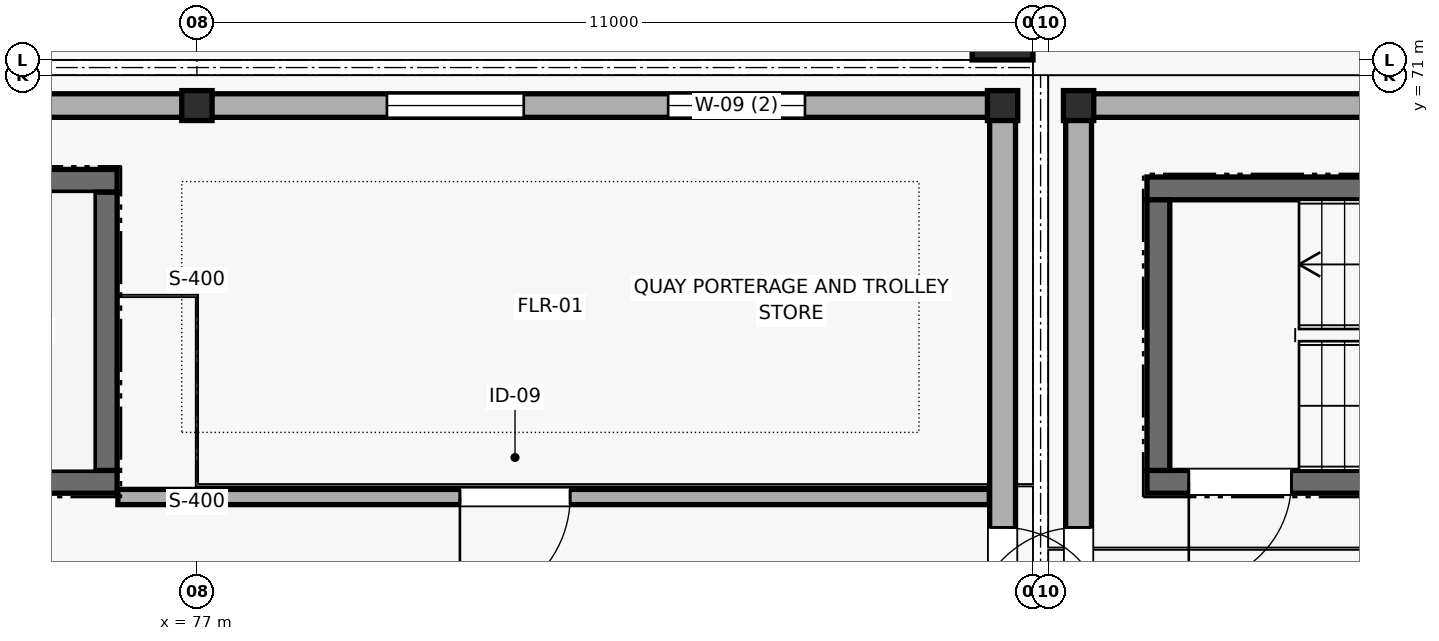
"""IFC4 building model, lengths in metres.
Left out: names, types, materials, properties, quantities, classifications, styles, units other than length and angle.
Written with IfcOpenShell. Run it as: python <this file> out.ifc"""

import sys

from ifc_helpers import new_model, si_unit, direction, frame, frame_2d, origin, origin_2d, place, context, subcontext, project, spatial, rectangle, i_section, extrude, element, fill, save


model = new_model("IFC4")
c1 = context("Model", 3, precision=1e-05, world=origin(), true_north=direction((0.0, 1.0)))
c2 = subcontext(c1, "Body", "Model", "MODEL_VIEW")
j1 = project(units=[si_unit("LENGTHUNIT", "METRE"), si_unit("PLANEANGLEUNIT", "RADIAN")], contexts=[c1])
p1 = place(None, origin())
s1 = spatial("IfcSite", under=j1, at=p1, CompositionType="ELEMENT")
p2 = place(p1, origin())
s2 = spatial("IfcBuilding", under=s1, at=p2, CompositionType="ELEMENT")
p3 = place(p2, origin())
s3 = spatial("IfcBuildingStorey", under=s2, at=p3, CompositionType="ELEMENT", Elevation=0.0)
for number, where, z_axis, x_axis in (
    (1, (77.0, 70.6, 0.0), (0.0, 0.0, 1.0), (1.0, 0.0, 0.0)),
    (2, (87.6, 70.6, 0.0), (0.0, 0.0, 1.0), (1.0, 0.0, 0.0)),
    (3, (88.6, 70.6, 0.0), (0.0, 0.0, 1.0), (1.0, 0.0, 0.0)),
):
    element("IfcColumn", number, at=place(p3, frame(where, z_axis=z_axis, x_axis=x_axis)), inside=s3, PredefinedType="COLUMN", context=c2, shape_type="SweptSolid", body=[
        extrude(i_section(OverallWidth=0.399, OverallDepth=0.394, WebThickness=0.023, FlangeThickness=0.037, FilletRadius=0.018, at=origin_2d()), origin(), (0.0, 0.0, 1.0), 5.4),
    ])
p4 = place(p3, frame((87.6, 71.6, 0.0), z_axis=(0.0, 0.0, 1.0), x_axis=(1.0, 0.0, 0.0)))
e4 = element("IfcColumn", 4, at=p4, inside=s3, PredefinedType="COLUMN", context=c2, shape_type="SweptSolid", body=[
    extrude(rectangle(XDim=0.8, YDim=0.8, at=origin_2d()), origin(), (0.0, 0.0, 1.0), 5.4),
])
p5 = place(p3, frame((87.6, 62.946, 0.0), z_axis=(0.0, 0.0, 1.0), x_axis=(0.0, 1.0, 0.0)))
e5 = element("IfcWall", 5, at=p5, inside=s3, PredefinedType="SOLIDWALL", context=c2, shape_type="SweptSolid", body=[
    extrude(rectangle(XDim=7.459, YDim=0.34, at=frame_2d((3.729, 0.0))), origin(), (0.0, 0.0, 1.0), 4.483),
])
p6 = place(p5, frame((0.704, 0.0, 0.0)))
e6 = element("IfcOpeningElement", 6, at=p6, cuts=e5, PredefinedType="OPENING", context=c2, shape_type="SweptSolid", body=[
    extrude(rectangle(XDim=1.4, YDim=2.25, at=frame_2d((0.7, 1.125))), frame((0.0, 0.18, 0.0), z_axis=(0.0, -1.0, 0.0), x_axis=(1.0, 0.0, 0.0)), (0.0, 0.0, 1.0), 0.36),
])
p7 = place(p3, frame((88.6, 70.405, 0.0), z_axis=(0.0, 0.0, 1.0), x_axis=(0.0, -1.0, 0.0)))
e7 = element("IfcWall", 7, at=p7, inside=s3, PredefinedType="SOLIDWALL", context=c2, shape_type="SweptSolid", body=[
    extrude(rectangle(XDim=7.459, YDim=0.34, at=frame_2d((3.729, 0.0))), origin(), (0.0, 0.0, 1.0), 4.483),
])
p8 = place(p7, frame((5.355, 0.0, 0.0)))
e8 = element("IfcOpeningElement", 8, at=p8, cuts=e7, PredefinedType="OPENING", context=c2, shape_type="SweptSolid", body=[
    extrude(rectangle(XDim=1.4, YDim=2.25, at=frame_2d((0.7, 1.125))), frame((0.0, 0.18, 0.0), z_axis=(0.0, -1.0, 0.0), x_axis=(1.0, 0.0, 0.0)), (0.0, 0.0, 1.0), 0.36),
])
p9 = place(p3, frame((76.991, 70.6, 0.0), z_axis=(0.0, 0.0, 1.0), x_axis=(-1.0, 0.0, 0.0)))
e9 = element("IfcWall", 9, at=p9, inside=s3, PredefinedType="SOLIDWALL", context=c2, shape_type="SweptSolid", body=[
    extrude(rectangle(XDim=10.981, YDim=0.31, at=frame_2d((5.491, 0.0))), origin(), (0.0, 0.0, 1.0), 4.315),
])
p10 = place(p9, frame((2.591, 0.0, 1.05)))
e10 = element("IfcOpeningElement", 10, at=p10, cuts=e9, PredefinedType="OPENING", context=c2, shape_type="SweptSolid", body=[
    extrude(rectangle(XDim=1.8, YDim=1.8, at=frame_2d((0.9, 0.9))), frame((0.0, 0.165, 0.0), z_axis=(0.0, -1.0, 0.0), x_axis=(1.0, 0.0, 0.0)), (0.0, 0.0, 1.0), 0.33),
])
p11 = place(p9, frame((6.291, 0.0, 1.05)))
e11 = element("IfcOpeningElement", 11, at=p11, cuts=e9, PredefinedType="OPENING", context=c2, shape_type="SweptSolid", body=[
    extrude(rectangle(XDim=1.8, YDim=1.8, at=frame_2d((0.9, 0.9))), frame((0.0, 0.165, 0.0), z_axis=(0.0, -1.0, 0.0), x_axis=(1.0, 0.0, 0.0)), (0.0, 0.0, 1.0), 0.33),
])
p12 = place(p3, frame((87.591, 70.6, 0.0), z_axis=(0.0, 0.0, 1.0), x_axis=(-1.0, 0.0, 0.0)))
e12 = element("IfcWall", 12, at=p12, inside=s3, PredefinedType="SOLIDWALL", context=c2, shape_type="SweptSolid", body=[
    extrude(rectangle(XDim=10.582, YDim=0.31, at=frame_2d((5.291, 0.0))), origin(), (0.0, 0.0, 1.0), 4.315),
])
p13 = place(p12, frame((2.591, 0.0, 1.05)))
e13 = element("IfcOpeningElement", 13, at=p13, cuts=e12, PredefinedType="OPENING", context=c2, shape_type="SweptSolid", body=[
    extrude(rectangle(XDim=1.8, YDim=1.8, at=frame_2d((0.9, 0.9))), frame((0.0, 0.165, 0.0), z_axis=(0.0, -1.0, 0.0), x_axis=(1.0, 0.0, 0.0)), (0.0, 0.0, 1.0), 0.33),
])
p14 = place(p12, frame((6.291, 0.0, 1.05)))
e14 = element("IfcOpeningElement", 14, at=p14, cuts=e12, PredefinedType="OPENING", context=c2, shape_type="SweptSolid", body=[
    extrude(rectangle(XDim=1.8, YDim=1.8, at=frame_2d((0.9, 0.9))), frame((0.0, 0.165, 0.0), z_axis=(0.0, -1.0, 0.0), x_axis=(1.0, 0.0, 0.0)), (0.0, 0.0, 1.0), 0.33),
])
p15 = place(p3, frame((99.191, 70.6, 0.0), z_axis=(0.0, 0.0, 1.0), x_axis=(-1.0, 0.0, 0.0)))
e15 = element("IfcWall", 15, at=p15, inside=s3, PredefinedType="SOLIDWALL", context=c2, shape_type="SweptSolid", body=[
    extrude(rectangle(XDim=10.581, YDim=0.31, at=frame_2d((5.291, 0.0))), origin(), (0.0, 0.0, 1.0), 4.402),
])
p16 = place(p15, frame((4.291, 0.0, 0.0)))
e16 = element("IfcOpeningElement", 16, at=p16, cuts=e15, PredefinedType="OPENING", context=c2, shape_type="SweptSolid", body=[
    extrude(rectangle(XDim=2.4, YDim=2.6, at=frame_2d((1.2, 1.3))), frame((0.0, 0.165, 0.0), z_axis=(0.0, -1.0, 0.0), x_axis=(1.0, 0.0, 0.0)), (0.0, 0.0, 1.0), 0.33),
])
p17 = place(p3, frame((67.3, 65.65, 0.0), z_axis=(0.0, 0.0, 1.0), x_axis=(1.0, 0.0, 0.0)))
e17 = element("IfcWall", 17, at=p17, inside=s3, PredefinedType="SHEAR", context=c2, shape_type="SweptSolid", body=[
    extrude(rectangle(XDim=8.65, YDim=0.3, at=frame_2d((4.325, 0.0))), origin(), (0.0, 0.0, 1.0), 5.1),
])
p18 = place(p17, frame((0.55, 0.0, 0.0)))
e18 = element("IfcOpeningElement", 18, at=p18, cuts=e17, PredefinedType="OPENING", context=c2, shape_type="SweptSolid", body=[
    extrude(rectangle(XDim=1.35, YDim=2.2, at=frame_2d((0.675, 1.1))), frame((0.0, 0.16, 0.0), z_axis=(0.0, -1.0, 0.0), x_axis=(1.0, 0.0, 0.0)), (0.0, 0.0, 1.0), 0.32),
])
p19 = place(p3, frame((75.95, 69.61, 0.0), z_axis=(0.0, 0.0, 1.0), x_axis=(-1.0, 0.0, 0.0)))
e19 = element("IfcWall", 19, at=p19, inside=s3, PredefinedType="SHEAR", context=c2, shape_type="SweptSolid", body=[
    extrude(rectangle(XDim=8.65, YDim=0.3, at=frame_2d((4.325, 0.0))), origin(), (0.0, 0.0, 1.0), 5.1),
])
p20 = place(p3, frame((75.8, 65.8, 0.0), z_axis=(0.0, 0.0, 1.0), x_axis=(0.0, 1.0, 0.0)))
e20 = element("IfcWall", 20, at=p20, inside=s3, PredefinedType="SHEAR", context=c2, shape_type="SweptSolid", body=[
    extrude(rectangle(XDim=3.66, YDim=0.3, at=frame_2d((1.83, 0.0))), origin(), (0.0, 0.0, 1.0), 5.1),
])
p21 = place(p3, frame((89.5, 65.65, 0.0), z_axis=(0.0, 0.0, 1.0), x_axis=(1.0, 0.0, 0.0)))
e21 = element("IfcWall", 21, at=p21, inside=s3, PredefinedType="SHEAR", context=c2, shape_type="SweptSolid", body=[
    extrude(rectangle(XDim=8.65, YDim=0.3, at=frame_2d((4.325, 0.0))), origin(), (0.0, 0.0, 1.0), 5.1),
])
p22 = place(p21, frame((0.55, 0.0, 0.0)))
e22 = element("IfcOpeningElement", 22, at=p22, cuts=e21, PredefinedType="OPENING", context=c2, shape_type="SweptSolid", body=[
    extrude(rectangle(XDim=1.35, YDim=2.2, at=frame_2d((0.675, 1.1))), frame((0.0, 0.16, 0.0), z_axis=(0.0, -1.0, 0.0), x_axis=(1.0, 0.0, 0.0)), (0.0, 0.0, 1.0), 0.32),
])
p23 = place(p3, frame((98.15, 69.51, 0.0), z_axis=(0.0, 0.0, 1.0), x_axis=(-1.0, 0.0, 0.0)))
e23 = element("IfcWall", 23, at=p23, inside=s3, PredefinedType="SHEAR", context=c2, shape_type="SweptSolid", body=[
    extrude(rectangle(XDim=8.65, YDim=0.3, at=frame_2d((4.325, 0.0))), origin(), (0.0, 0.0, 1.0), 5.1),
])
p24 = place(p3, frame((89.65, 69.36, 0.0), z_axis=(0.0, 0.0, 1.0), x_axis=(0.0, -1.0, 0.0)))
e24 = element("IfcWall", 24, at=p24, inside=s3, PredefinedType="SHEAR", context=c2, shape_type="SweptSolid", body=[
    extrude(rectangle(XDim=3.56, YDim=0.3, at=frame_2d((1.78, 0.0))), origin(), (0.0, 0.0, 1.0), 5.1),
])
p25 = place(p3, frame((75.96, 65.45, 0.0), z_axis=(0.0, 0.0, 1.0), x_axis=(1.0, 0.0, 0.0)))
e25 = element("IfcWall", 25, at=p25, inside=s3, PredefinedType="PARTITIONING", context=c2, shape_type="SweptSolid", body=[
    extrude(rectangle(XDim=11.465, YDim=0.2, at=frame_2d((5.732, 0.0))), origin(), (0.0, 0.0, 1.0), 4.483),
])
p26 = place(p25, frame((4.5, 0.0, 0.0)))
e26 = element("IfcOpeningElement", 26, at=p26, cuts=e25, PredefinedType="OPENING", context=c2, shape_type="SweptSolid", body=[
    extrude(rectangle(XDim=1.45, YDim=2.3, at=frame_2d((0.725, 1.15))), frame((0.0, 0.11, 0.0), z_axis=(0.0, -1.0, 0.0), x_axis=(1.0, 0.0, 0.0)), (0.0, 0.0, 1.0), 0.22),
])
p27 = place(p6, frame((1.4, 0.0, 0.0), z_axis=(0.0, 0.0, 1.0), x_axis=(-1.0, 0.0, 0.0)))
e27 = element("IfcDoor", 27, at=p27, inside=s3, OperationType="SINGLE_SWING_RIGHT", PredefinedType="DOOR", context=c2, shape_type="SweptSolid", body=[
    extrude(rectangle(XDim=1.4, YDim=2.25, at=frame_2d((0.7, 1.125))), frame((0.0, 0.025, 0.0), z_axis=(0.0, -1.0, 0.0), x_axis=(1.0, 0.0, 0.0)), (0.0, 0.0, 1.0), 0.05),
])
fill(e6, e27)
p28 = place(p8, frame((1.4, 0.0, 0.0), z_axis=(0.0, 0.0, 1.0), x_axis=(-1.0, 0.0, 0.0)))
e28 = element("IfcDoor", 28, at=p28, inside=s3, OperationType="SINGLE_SWING_LEFT", PredefinedType="DOOR", context=c2, shape_type="SweptSolid", body=[
    extrude(rectangle(XDim=1.4, YDim=2.25, at=frame_2d((0.7, 1.125))), frame((0.0, 0.025, 0.0), z_axis=(0.0, -1.0, 0.0), x_axis=(1.0, 0.0, 0.0)), (0.0, 0.0, 1.0), 0.05),
])
fill(e8, e28)
p29 = place(p13, origin())
e29 = element("IfcWindow", 29, at=p29, inside=s3, PartitioningType="SINGLE_PANEL", PredefinedType="WINDOW", context=c2, shape_type="SweptSolid", body=[
    extrude(rectangle(XDim=1.8, YDim=1.8, at=frame_2d((0.9, 0.9))), frame((0.0, 0.03, 0.0), z_axis=(0.0, -1.0, 0.0), x_axis=(1.0, 0.0, 0.0)), (0.0, 0.0, 1.0), 0.06),
])
fill(e13, e29)
p30 = place(p14, origin())
e30 = element("IfcWindow", 30, at=p30, inside=s3, PartitioningType="SINGLE_PANEL", PredefinedType="WINDOW", context=c2, shape_type="SweptSolid", body=[
    extrude(rectangle(XDim=1.8, YDim=1.8, at=frame_2d((0.9, 0.9))), frame((0.0, 0.03, 0.0), z_axis=(0.0, -1.0, 0.0), x_axis=(1.0, 0.0, 0.0)), (0.0, 0.0, 1.0), 0.06),
])
fill(e14, e30)
p31 = place(p22, frame((1.35, 0.0, 0.0), z_axis=(0.0, 0.0, 1.0), x_axis=(-1.0, 0.0, 0.0)))
e31 = element("IfcDoor", 31, at=p31, inside=s3, OperationType="SINGLE_SWING_RIGHT", PredefinedType="DOOR", context=c2, shape_type="SweptSolid", body=[
    extrude(rectangle(XDim=1.35, YDim=2.2, at=frame_2d((0.675, 1.1))), frame((0.0, 0.025, 0.0), z_axis=(0.0, -1.0, 0.0), x_axis=(1.0, 0.0, 0.0)), (0.0, 0.0, 1.0), 0.05),
])
fill(e22, e31)
p32 = place(p26, frame((1.45, 0.0, 0.0), z_axis=(0.0, 0.0, 1.0), x_axis=(-1.0, 0.0, 0.0)))
e32 = element("IfcDoor", 32, at=p32, inside=s3, OperationType="SINGLE_SWING_RIGHT", PredefinedType="DOOR", context=c2, shape_type="SweptSolid", body=[
    extrude(rectangle(XDim=1.45, YDim=2.3, at=frame_2d((0.725, 1.15))), frame((0.0, 0.025, 0.0), z_axis=(0.0, -1.0, 0.0), x_axis=(1.0, 0.0, 0.0)), (0.0, 0.0, 1.0), 0.05),
])
fill(e26, e32)
save(model, sys.argv[1])
